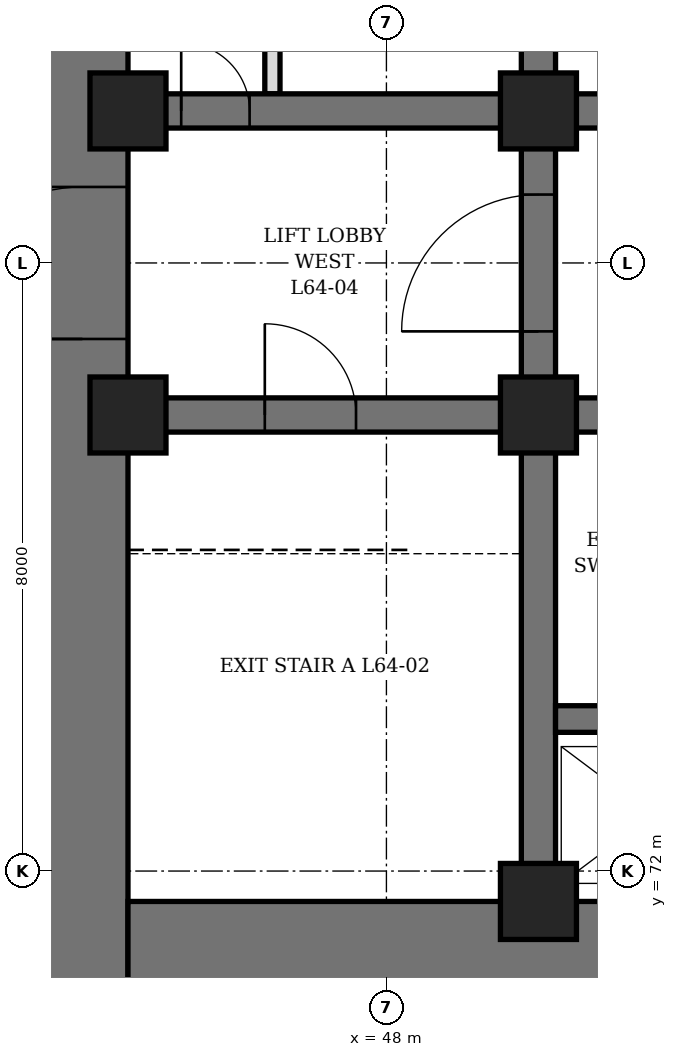
"""IFC4 building model, lengths in metres.
Left out: names, types, materials, properties, quantities, classifications, styles, units other than length and angle.
Written with IfcOpenShell. Run it as: python <this file> out.ifc"""

import sys

from ifc_helpers import new_model, si_unit, direction, frame, frame_2d, origin, origin_2d, place, context, subcontext, project, spatial, polyline, rectangle, hollow_rectangle, outline, extrude, element, fill, save


model = new_model("IFC4")
c1 = context("Model", 3, precision=1e-05, world=origin(), true_north=direction((0.0, 1.0)))
c2 = subcontext(c1, "Body", "Model", "MODEL_VIEW")
j1 = project(units=[si_unit("LENGTHUNIT", "METRE"), si_unit("PLANEANGLEUNIT", "RADIAN")], contexts=[c1])
p1 = place(None, origin())
s1 = spatial("IfcSite", under=j1, at=p1, CompositionType="ELEMENT")
p2 = place(p1, origin())
s2 = spatial("IfcBuilding", under=s1, at=p2, CompositionType="ELEMENT")
p3 = place(p2, frame((0.0, 0.0, 285.7)))
s3 = spatial("IfcBuildingStorey", under=s2, at=p3, CompositionType="ELEMENT", Elevation=285.7)
p4 = place(p3, frame((44.0, 70.4, 0.0), z_axis=(0.0, 0.0, 1.0), x_axis=(0.0, 1.0, 0.0)))
e1 = element("IfcWall", 1, at=p4, inside=s3, PredefinedType="SHEAR", context=c2, shape_type="SweptSolid", body=[
    extrude(outline(polyline([(0.0, 0.0), (19.2, 0.0), (19.2, 16.743), (0.0, 9.537), (0.0, 0.0)])), frame((0.0, 0.6, 0.0), z_axis=(0.0, -1.0, 0.0), x_axis=(1.0, 0.0, 0.0)), (0.0, 0.0, 1.0), 1.2),
])
p5 = place(p4, frame((8.6, 0.0, 0.0)))
e2 = element("IfcOpeningElement", 2, at=p5, cuts=e1, PredefinedType="OPENING", context=c2, shape_type="SweptSolid", body=[
    extrude(rectangle(XDim=2.0, YDim=2.4, at=frame_2d((1.0, 1.2))), frame((0.0, 0.61, 0.0), z_axis=(0.0, -1.0, 0.0), x_axis=(1.0, 0.0, 0.0)), (0.0, 0.0, 1.0), 1.22),
])
p6 = place(p3, frame((44.6, 71.0, 0.0), z_axis=(0.0, 0.0, 1.0), x_axis=(1.0, 0.0, 0.0)))
e3 = element("IfcWall", 3, at=p6, inside=s3, PredefinedType="SHEAR", context=c2, shape_type="SweptSolid", body=[
    extrude(outline(polyline([(0.0, 0.0), (22.8, 0.0), (22.8, 9.537), (0.0, 9.537), (0.0, 0.0)])), frame((0.0, 0.6, 0.0), z_axis=(0.0, -1.0, 0.0), x_axis=(1.0, 0.0, 0.0)), (0.0, 0.0, 1.0), 1.2),
])
p7 = place(p3, frame((50.0, 71.6, 0.0), z_axis=(0.0, 0.0, 1.0), x_axis=(0.0, 1.0, 0.0)))
e4 = element("IfcWall", 4, at=p7, inside=s3, PredefinedType="SHEAR", context=c2, shape_type="SweptSolid", body=[
    extrude(outline(polyline([(0.0, 0.0), (16.8, 0.0), (16.8, 16.293), (0.0, 9.987), (0.0, 0.0)])), frame((0.0, 0.225, 0.0), z_axis=(0.0, -1.0, 0.0), x_axis=(1.0, 0.0, 0.0)), (0.0, 0.0, 1.0), 0.45),
])
p8 = place(p7, frame((7.5, 0.0, 0.0)))
e5 = element("IfcOpeningElement", 5, at=p8, cuts=e4, PredefinedType="OPENING", context=c2, shape_type="SweptSolid", body=[
    extrude(rectangle(XDim=1.8, YDim=2.4, at=frame_2d((0.9, 1.2))), frame((0.0, 0.235, 0.0), z_axis=(0.0, -1.0, 0.0), x_axis=(1.0, 0.0, 0.0)), (0.0, 0.0, 1.0), 0.47),
])
p9 = place(p3, frame((44.6, 78.0, 0.0), z_axis=(0.0, 0.0, 1.0), x_axis=(1.0, 0.0, 0.0)))
e6 = element("IfcWall", 6, at=p9, inside=s3, PredefinedType="SHEAR", context=c2, shape_type="SweptSolid", body=[
    extrude(outline(polyline([(0.0, 0.0), (5.175, 0.0), (5.175, 12.305), (0.0, 12.305), (0.0, 0.0)])), frame((0.0, 0.225, 0.0), z_axis=(0.0, -1.0, 0.0), x_axis=(1.0, 0.0, 0.0)), (0.0, 0.0, 1.0), 0.45),
])
p10 = place(p9, frame((1.8, 0.0, 0.0)))
e7 = element("IfcOpeningElement", 7, at=p10, cuts=e6, PredefinedType="OPENING", context=c2, shape_type="SweptSolid", body=[
    extrude(rectangle(XDim=1.2, YDim=2.1, at=frame_2d((0.6, 1.05))), frame((0.0, 0.235, 0.0), z_axis=(0.0, -1.0, 0.0), x_axis=(1.0, 0.0, 0.0)), (0.0, 0.0, 1.0), 0.47),
])
p11 = place(p3, frame((44.6, 82.0, 0.0), z_axis=(0.0, 0.0, 1.0), x_axis=(1.0, 0.0, 0.0)))
e8 = element("IfcWall", 8, at=p11, inside=s3, PredefinedType="SHEAR", context=c2, shape_type="SweptSolid", body=[
    extrude(outline(polyline([(0.0, 0.0), (5.175, 0.0), (5.175, 13.806), (0.0, 13.806), (0.0, 0.0)])), frame((0.0, 0.225, 0.0), z_axis=(0.0, -1.0, 0.0), x_axis=(1.0, 0.0, 0.0)), (0.0, 0.0, 1.0), 0.45),
])
p12 = place(p11, frame((0.7, 0.0, 0.0)))
e9 = element("IfcOpeningElement", 9, at=p12, cuts=e8, PredefinedType="OPENING", context=c2, shape_type="SweptSolid", body=[
    extrude(rectangle(XDim=0.9, YDim=2.1, at=frame_2d((0.45, 1.05))), frame((0.0, 0.235, 0.0), z_axis=(0.0, -1.0, 0.0), x_axis=(1.0, 0.0, 0.0)), (0.0, 0.0, 1.0), 0.47),
])
p13 = place(p3, frame((50.225, 78.0, 0.0), z_axis=(0.0, 0.0, 1.0), x_axis=(1.0, 0.0, 0.0)))
e10 = element("IfcWall", 10, at=p13, inside=s3, PredefinedType="SHEAR", context=c2, shape_type="SweptSolid", body=[
    extrude(outline(polyline([(0.0, 0.0), (11.55, 0.0), (11.55, 12.305), (0.0, 12.305), (0.0, 0.0)])), frame((0.0, 0.225, 0.0), z_axis=(0.0, -1.0, 0.0), x_axis=(1.0, 0.0, 0.0)), (0.0, 0.0, 1.0), 0.45),
])
p14 = place(p13, frame((0.825, 0.0, 0.0)))
e11 = element("IfcOpeningElement", 11, at=p14, cuts=e10, PredefinedType="OPENING", context=c2, shape_type="SweptSolid", body=[
    extrude(rectangle(XDim=0.9, YDim=2.1, at=frame_2d((0.45, 1.05))), frame((0.0, 0.235, 0.0), z_axis=(0.0, -1.0, 0.0), x_axis=(1.0, 0.0, 0.0)), (0.0, 0.0, 1.0), 0.47),
])
p15 = place(p13, frame((3.825, 0.0, 0.0)))
e12 = element("IfcOpeningElement", 12, at=p15, cuts=e10, PredefinedType="OPENING", context=c2, shape_type="SweptSolid", body=[
    extrude(rectangle(XDim=0.9, YDim=2.1, at=frame_2d((0.45, 1.05))), frame((0.0, 0.235, 0.0), z_axis=(0.0, -1.0, 0.0), x_axis=(1.0, 0.0, 0.0)), (0.0, 0.0, 1.0), 0.47),
])
p16 = place(p13, frame((6.825, 0.0, 0.0)))
e13 = element("IfcOpeningElement", 13, at=p16, cuts=e10, PredefinedType="OPENING", context=c2, shape_type="SweptSolid", body=[
    extrude(rectangle(XDim=0.9, YDim=2.1, at=frame_2d((0.45, 1.05))), frame((0.0, 0.235, 0.0), z_axis=(0.0, -1.0, 0.0), x_axis=(1.0, 0.0, 0.0)), (0.0, 0.0, 1.0), 0.47),
])
p17 = place(p13, frame((9.825, 0.0, 0.0)))
e14 = element("IfcOpeningElement", 14, at=p17, cuts=e10, PredefinedType="OPENING", context=c2, shape_type="SweptSolid", body=[
    extrude(rectangle(XDim=0.9, YDim=2.1, at=frame_2d((0.45, 1.05))), frame((0.0, 0.235, 0.0), z_axis=(0.0, -1.0, 0.0), x_axis=(1.0, 0.0, 0.0)), (0.0, 0.0, 1.0), 0.47),
])
p18 = place(p3, frame((50.225, 82.0, 0.0), z_axis=(0.0, 0.0, 1.0), x_axis=(1.0, 0.0, 0.0)))
e15 = element("IfcWall", 15, at=p18, inside=s3, PredefinedType="SHEAR", context=c2, shape_type="SweptSolid", body=[
    extrude(outline(polyline([(0.0, 0.0), (11.55, 0.0), (11.55, 13.806), (0.0, 13.806), (0.0, 0.0)])), frame((0.0, 0.225, 0.0), z_axis=(0.0, -1.0, 0.0), x_axis=(1.0, 0.0, 0.0)), (0.0, 0.0, 1.0), 0.45),
])
p19 = place(p18, frame((0.825, 0.0, 0.0)))
e16 = element("IfcOpeningElement", 16, at=p19, cuts=e15, PredefinedType="OPENING", context=c2, shape_type="SweptSolid", body=[
    extrude(rectangle(XDim=0.9, YDim=2.1, at=frame_2d((0.45, 1.05))), frame((0.0, 0.235, 0.0), z_axis=(0.0, -1.0, 0.0), x_axis=(1.0, 0.0, 0.0)), (0.0, 0.0, 1.0), 0.47),
])
p20 = place(p18, frame((3.825, 0.0, 0.0)))
e17 = element("IfcOpeningElement", 17, at=p20, cuts=e15, PredefinedType="OPENING", context=c2, shape_type="SweptSolid", body=[
    extrude(rectangle(XDim=0.9, YDim=2.1, at=frame_2d((0.45, 1.05))), frame((0.0, 0.235, 0.0), z_axis=(0.0, -1.0, 0.0), x_axis=(1.0, 0.0, 0.0)), (0.0, 0.0, 1.0), 0.47),
])
p21 = place(p18, frame((6.825, 0.0, 0.0)))
e18 = element("IfcOpeningElement", 18, at=p21, cuts=e15, PredefinedType="OPENING", context=c2, shape_type="SweptSolid", body=[
    extrude(rectangle(XDim=0.9, YDim=2.1, at=frame_2d((0.45, 1.05))), frame((0.0, 0.235, 0.0), z_axis=(0.0, -1.0, 0.0), x_axis=(1.0, 0.0, 0.0)), (0.0, 0.0, 1.0), 0.47),
])
p22 = place(p18, frame((9.825, 0.0, 0.0)))
e19 = element("IfcOpeningElement", 19, at=p22, cuts=e15, PredefinedType="OPENING", context=c2, shape_type="SweptSolid", body=[
    extrude(rectangle(XDim=0.9, YDim=2.1, at=frame_2d((0.45, 1.05))), frame((0.0, 0.235, 0.0), z_axis=(0.0, -1.0, 0.0), x_axis=(1.0, 0.0, 0.0)), (0.0, 0.0, 1.0), 0.47),
])
p23 = place(p3, frame((50.225, 74.0, 0.0), z_axis=(0.0, 0.0, 1.0), x_axis=(1.0, 0.0, 0.0)))
e20 = element("IfcWall", 20, at=p23, inside=s3, PredefinedType="SHEAR", context=c2, shape_type="SweptSolid", body=[
    extrude(outline(polyline([(0.0, 0.0), (11.55, 0.0), (11.55, 10.822), (0.0, 10.822), (0.0, 0.0)])), frame((0.0, 0.175, 0.0), z_axis=(0.0, -1.0, 0.0), x_axis=(1.0, 0.0, 0.0)), (0.0, 0.0, 1.0), 0.35),
])
p24 = place(p3, frame((44.6, 78.0, 0.0), z_axis=(0.0, 0.0, 1.0), x_axis=(1.0, 0.0, 0.0)))
e21 = element("IfcColumn", 21, at=p24, inside=s3, PredefinedType="COLUMN", context=c2, shape_type="SweptSolid", body=[
    extrude(hollow_rectangle(XDim=1.0, YDim=1.0, WallThickness=0.15, at=origin_2d()), origin(), (0.0, 0.0, 1.0), 12.201),
])
p25 = place(p3, frame((44.6, 82.0, 0.0), z_axis=(0.0, 0.0, 1.0), x_axis=(1.0, 0.0, 0.0)))
e22 = element("IfcColumn", 22, at=p25, inside=s3, PredefinedType="COLUMN", context=c2, shape_type="SweptSolid", body=[
    extrude(hollow_rectangle(XDim=1.0, YDim=1.0, WallThickness=0.15, at=origin_2d()), origin(), (0.0, 0.0, 1.0), 13.703),
])
p26 = place(p3, frame((50.0, 71.6, 0.0), z_axis=(0.0, 0.0, 1.0), x_axis=(1.0, 0.0, 0.0)))
e23 = element("IfcColumn", 23, at=p26, inside=s3, PredefinedType="COLUMN", context=c2, shape_type="SweptSolid", body=[
    extrude(hollow_rectangle(XDim=1.0, YDim=1.0, WallThickness=0.15, at=origin_2d()), origin(), (0.0, 0.0, 1.0), 9.799),
])
p27 = place(p3, frame((50.0, 78.0, 0.0), z_axis=(0.0, 0.0, 1.0), x_axis=(1.0, 0.0, 0.0)))
e24 = element("IfcColumn", 24, at=p27, inside=s3, PredefinedType="COLUMN", context=c2, shape_type="SweptSolid", body=[
    extrude(hollow_rectangle(XDim=1.0, YDim=1.0, WallThickness=0.15, at=origin_2d()), origin(), (0.0, 0.0, 1.0), 12.201),
])
p28 = place(p3, frame((50.0, 82.0, 0.0), z_axis=(0.0, 0.0, 1.0), x_axis=(1.0, 0.0, 0.0)))
e25 = element("IfcColumn", 25, at=p28, inside=s3, PredefinedType="COLUMN", context=c2, shape_type="SweptSolid", body=[
    extrude(hollow_rectangle(XDim=1.0, YDim=1.0, WallThickness=0.15, at=origin_2d()), origin(), (0.0, 0.0, 1.0), 13.703),
])
p29 = place(p3, frame((46.5, 82.225, 0.0), z_axis=(0.0, 0.0, 1.0), x_axis=(0.0, 1.0, 0.0)))
e26 = element("IfcWall", 26, at=p29, inside=s3, PredefinedType="PARTITIONING", context=c2, shape_type="SweptSolid", body=[
    extrude(rectangle(XDim=3.05, YDim=0.2, at=frame_2d((1.525, 0.0))), origin(), (0.0, 0.0, 1.0), 8.0),
])
p30 = place(p29, frame((1.075, 0.0, 0.0)))
e27 = element("IfcOpeningElement", 27, at=p30, cuts=e26, PredefinedType="OPENING", context=c2, shape_type="SweptSolid", body=[
    extrude(rectangle(XDim=0.9, YDim=2.1, at=frame_2d((0.45, 1.05))), frame((0.0, 0.11, 0.0), z_axis=(0.0, -1.0, 0.0), x_axis=(1.0, 0.0, 0.0)), (0.0, 0.0, 1.0), 0.22),
])
p31 = place(p12, origin())
e28 = element("IfcDoor", 28, at=p31, inside=s3, OperationType="SINGLE_SWING_LEFT", PredefinedType="DOOR", context=c2, shape_type="SweptSolid", body=[
    extrude(rectangle(XDim=0.9, YDim=2.1, at=frame_2d((0.45, 1.05))), frame((0.0, 0.225, 0.0), z_axis=(0.0, -1.0, 0.0), x_axis=(1.0, 0.0, 0.0)), (0.0, 0.0, 1.0), 0.449),
])
fill(e9, e28)
p32 = place(p10, origin())
e29 = element("IfcDoor", 29, at=p32, inside=s3, OperationType="SINGLE_SWING_LEFT", PredefinedType="DOOR", context=c2, shape_type="SweptSolid", body=[
    extrude(rectangle(XDim=1.2, YDim=2.1, at=frame_2d((0.6, 1.05))), frame((0.0, 0.225, 0.0), z_axis=(0.0, -1.0, 0.0), x_axis=(1.0, 0.0, 0.0)), (0.0, 0.0, 1.0), 0.449),
])
fill(e7, e29)
p33 = place(p5, origin())
e30 = element("IfcDoor", 30, at=p33, inside=s3, OperationType="DOUBLE_DOOR_SINGLE_SWING", PredefinedType="DOOR", context=c2, shape_type="SweptSolid", body=[
    extrude(rectangle(XDim=2.0, YDim=2.4, at=frame_2d((1.0, 1.2))), frame((0.0, 0.35, 0.0), z_axis=(0.0, -1.0, 0.0), x_axis=(1.0, 0.0, 0.0)), (0.0, 0.0, 1.0), 0.7),
])
fill(e2, e30)
p34 = place(p8, origin())
e31 = element("IfcDoor", 31, at=p34, inside=s3, OperationType="DOUBLE_DOOR_SINGLE_SWING", PredefinedType="DOOR", context=c2, shape_type="SweptSolid", body=[
    extrude(rectangle(XDim=1.8, YDim=2.4, at=frame_2d((0.9, 1.2))), frame((0.0, 0.225, 0.0), z_axis=(0.0, -1.0, 0.0), x_axis=(1.0, 0.0, 0.0)), (0.0, 0.0, 1.0), 0.449),
])
fill(e5, e31)
save(model, sys.argv[1])
